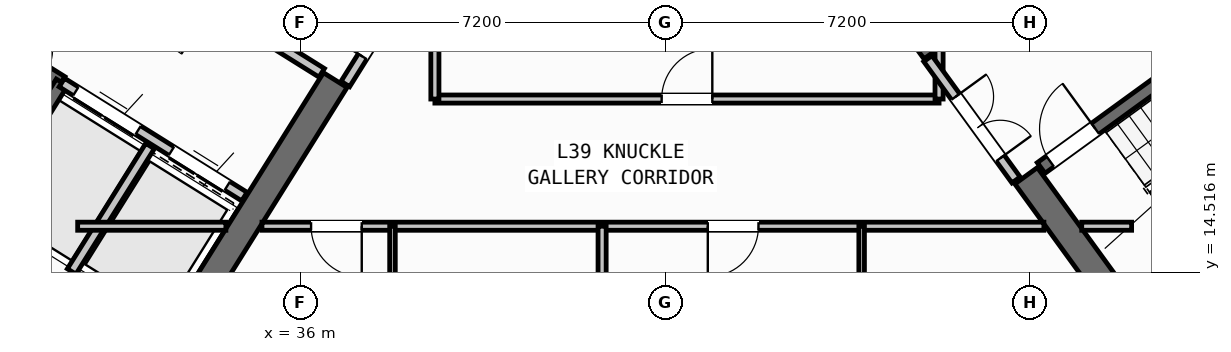
"""IFC4 building model, lengths in metres.
Left out: names, types, materials, properties, quantities, classifications, styles, units other than length and angle.
Written with IfcOpenShell. Run it as: python <this file> out.ifc"""

import sys

from ifc_helpers import new_model, si_unit, direction, frame, frame_2d, origin, place, context, subcontext, project, spatial, rectangle, extrude, source, transform, mapped, element, fill, save


model = new_model("IFC4")
c1 = context("Model", 3, precision=1e-05, world=origin(), true_north=direction((0.0, 1.0)))
c2 = subcontext(c1, "Body", "Model", "MODEL_VIEW")
j1 = project(units=[si_unit("LENGTHUNIT", "METRE"), si_unit("PLANEANGLEUNIT", "RADIAN")], contexts=[c1])
p1 = place(None, origin())
s1 = spatial("IfcSite", under=j1, at=p1, CompositionType="ELEMENT")
p2 = place(p1, origin())
s2 = spatial("IfcBuilding", under=s1, at=p2, CompositionType="ELEMENT")
p3 = place(p2, frame((0.0, 0.0, 155.1)))
s3 = spatial("IfcBuildingStorey", under=s2, at=p3, CompositionType="ELEMENT", Elevation=155.1)
p4 = place(p3, frame((33.366, 12.477, 0.0), z_axis=(0.0, 0.0, 1.0), x_axis=(-0.848047359947, 0.529920442413, 0.0)))
e1 = element("IfcWall", 1, at=p4, inside=s3, PredefinedType="SHEAR", context=c2, shape_type="SweptSolid", body=[
    extrude(rectangle(XDim=13.14, YDim=0.55, at=frame_2d((6.57, 0.0))), origin(), (0.0, 0.0, 1.0), 3.35),
])
p5 = place(p3, frame((36.683, 18.304, 0.0), z_axis=(0.0, 0.0, 1.0), x_axis=(-0.529896466841, -0.848062341122, 0.0)))
e2 = element("IfcWall", 2, at=p5, inside=s3, PredefinedType="SHEAR", context=c2, shape_type="SweptSolid", body=[
    extrude(rectangle(XDim=6.425, YDim=0.55, at=frame_2d((3.212, 0.0))), origin(), (0.0, 0.0, 1.0), 3.35),
])
p6 = place(p3, frame((52.359, 13.14, 0.0), z_axis=(0.0, 0.0, 1.0), x_axis=(0.809014896919, 0.587788139183, 0.0)))
e3 = element("IfcWall", 3, at=p6, inside=s3, PredefinedType="SHEAR", context=c2, shape_type="SweptSolid", body=[
    extrude(rectangle(XDim=12.34, YDim=0.55, at=frame_2d((6.17, 0.0))), origin(), (0.0, 0.0, 1.0), 3.35),
])
p7 = place(p3, frame((52.42, 13.524, 0.0), z_axis=(0.0, 0.0, 1.0), x_axis=(-0.587802113096, 0.809004744015, 0.0)))
e4 = element("IfcWall", 4, at=p7, inside=s3, PredefinedType="SHEAR", context=c2, shape_type="SweptSolid", body=[
    extrude(rectangle(XDim=3.575, YDim=0.55, at=frame_2d((1.788, 0.0))), origin(), (0.0, 0.0, 1.0), 3.35),
])
p8 = place(p3, frame((48.526, 18.884, 0.0), z_axis=(0.0, 0.0, 1.0), x_axis=(-0.587764933797, 0.809031756236, 0.0)))
e5 = element("IfcWall", 5, at=p8, inside=s3, PredefinedType="SHEAR", context=c2, shape_type="SweptSolid", body=[
    extrude(rectangle(XDim=6.425, YDim=0.55, at=frame_2d((3.212, 0.0))), origin(), (0.0, 0.0, 1.0), 3.35),
])
p9 = place(p3, frame((31.28, 18.261, 0.0), z_axis=(0.0, 0.0, 1.0), x_axis=(-0.848051618787, 0.529913626805, 0.0)))
e6 = element("IfcWall", 6, at=p9, inside=s3, PredefinedType="SHEAR", context=c2, shape_type="SweptSolid", body=[
    extrude(rectangle(XDim=7.46, YDim=0.26, at=frame_2d((3.73, 0.0))), origin(), (0.0, 0.0, 1.0), 3.35),
])
p10 = place(p9, frame((0.36, 0.0, 0.0)))
e7 = element("IfcOpeningElement", 7, at=p10, cuts=e6, PredefinedType="OPENING", context=c2, shape_type="SweptSolid", body=[
    extrude(rectangle(XDim=0.86, YDim=2.05, at=frame_2d((0.43, 1.025))), frame((0.0, 0.14, 0.0), z_axis=(0.0, -1.0, 0.0), x_axis=(1.0, 0.0, 0.0)), (0.0, 0.0, 1.0), 0.28),
])
p11 = place(p3, frame((31.288, 18.256, 0.0), z_axis=(0.0, 0.0, 1.0), x_axis=(-0.529943379326, -0.848033026897, 0.0)))
e8 = element("IfcWall", 8, at=p11, inside=s3, PredefinedType="SHEAR", context=c2, shape_type="SweptSolid", body=[
    extrude(rectangle(XDim=3.16, YDim=0.26, at=frame_2d((1.58, 0.0))), origin(), (0.0, 0.0, 1.0), 3.35),
])
p12 = place(p3, frame((34.891, 16.005, 0.0), z_axis=(0.0, 0.0, 1.0), x_axis=(-0.848062873452, 0.529895614884, 0.0)))
e9 = element("IfcWall", 9, at=p12, inside=s3, PredefinedType="STANDARD", context=c2, shape_type="SweptSolid", body=[
    extrude(rectangle(XDim=4.248, YDim=0.2, at=frame_2d((2.124, 0.0))), origin(), (0.0, 0.0, 1.0), 3.34),
])
p13 = place(p12, frame((0.398, 0.0, 0.0)))
e10 = element("IfcOpeningElement", 10, at=p13, cuts=e9, PredefinedType="OPENING", context=c2, shape_type="SweptSolid", body=[
    extrude(rectangle(XDim=1.3, YDim=2.2, at=frame_2d((0.65, 1.1))), frame((0.0, 0.11, 0.0), z_axis=(0.0, -1.0, 0.0), x_axis=(1.0, 0.0, 0.0)), (0.0, 0.0, 1.0), 0.22),
])
p14 = place(p12, frame((2.473, 0.0, 0.0)))
e11 = element("IfcOpeningElement", 11, at=p14, cuts=e9, PredefinedType="OPENING", context=c2, shape_type="SweptSolid", body=[
    extrude(rectangle(XDim=1.45, YDim=2.25, at=frame_2d((0.725, 1.125))), frame((0.0, 0.11, 0.0), z_axis=(0.0, -1.0, 0.0), x_axis=(1.0, 0.0, 0.0)), (0.0, 0.0, 1.0), 0.22),
])
p15 = place(p3, frame((36.417, 18.447, 0.0), z_axis=(0.0, 0.0, 1.0), x_axis=(-0.848064879198, 0.529892404805, 0.0)))
e12 = element("IfcWall", 12, at=p15, inside=s3, PredefinedType="STANDARD", context=c2, shape_type="SweptSolid", body=[
    extrude(rectangle(XDim=5.768, YDim=0.2, at=frame_2d((2.884, 0.0))), origin(), (0.0, 0.0, 1.0), 3.34),
])
p16 = place(p15, frame((2.548, 0.0, 0.0)))
e13 = element("IfcOpeningElement", 13, at=p16, cuts=e12, PredefinedType="OPENING", context=c2, shape_type="SweptSolid", body=[
    extrude(rectangle(XDim=1.15, YDim=2.1, at=frame_2d((0.575, 1.05))), frame((0.0, 0.11, 0.0), z_axis=(0.0, -1.0, 0.0), x_axis=(1.0, 0.0, 0.0)), (0.0, 0.0, 1.0), 0.22),
])
p17 = place(p3, frame((33.029, 17.003, 0.0), z_axis=(0.0, 0.0, 1.0), x_axis=(-0.529916267533, -0.848049968695, 0.0)))
e14 = element("IfcWall", 14, at=p17, inside=s3, PredefinedType="STANDARD", context=c2, shape_type="SweptSolid", body=[
    extrude(rectangle(XDim=2.92, YDim=0.2, at=frame_2d((1.46, 0.0))), origin(), (0.0, 0.0, 1.0), 3.34),
])
p18 = place(p3, frame((52.472, 14.013, 0.0), z_axis=(0.0, 0.0, 1.0), x_axis=(0.809028366311, 0.587769599847, 0.0)))
e15 = element("IfcWall", 15, at=p18, inside=s3, PredefinedType="SHEAR", context=c2, shape_type="SweptSolid", body=[
    extrude(rectangle(XDim=7.33, YDim=0.26, at=frame_2d((3.665, 0.0))), origin(), (0.0, 0.0, 1.0), 3.35),
])
p19 = place(p3, frame((50.615, 16.57, 0.0), z_axis=(0.0, 0.0, 1.0), x_axis=(0.809028366311, 0.587769599847, 0.0)))
e16 = element("IfcWall", 16, at=p19, inside=s3, PredefinedType="SHEAR", context=c2, shape_type="SweptSolid", body=[
    extrude(rectangle(XDim=7.33, YDim=0.26, at=frame_2d((3.665, 0.0))), origin(), (0.0, 0.0, 1.0), 3.35),
])
p20 = place(p19, frame((0.22, 0.0, 0.0)))
e17 = element("IfcOpeningElement", 17, at=p20, cuts=e16, PredefinedType="OPENING", context=c2, shape_type="SweptSolid", body=[
    extrude(rectangle(XDim=1.1, YDim=2.1, at=frame_2d((0.55, 1.05))), frame((0.0, 0.14, 0.0), z_axis=(0.0, -1.0, 0.0), x_axis=(1.0, 0.0, 0.0)), (0.0, 0.0, 1.0), 0.28),
])
p21 = place(p3, frame((32.164, 10.374, 0.0), z_axis=(0.0, 0.0, 1.0), x_axis=(-0.848044107957, 0.529925646633, 0.0)))
e18 = element("IfcWall", 18, at=p21, inside=s3, PredefinedType="PARTITIONING", context=c2, shape_type="SweptSolid", body=[
    extrude(rectangle(XDim=15.57, YDim=0.16, at=frame_2d((7.785, 0.0))), origin(), (0.0, 0.0, 1.0), 3.34),
])
p22 = place(p21, frame((10.83, 0.0, 0.0)))
e19 = element("IfcOpeningElement", 19, at=p22, cuts=e18, PredefinedType="OPENING", context=c2, shape_type="SweptSolid", body=[
    extrude(rectangle(XDim=1.0, YDim=2.1, at=frame_2d((0.5, 1.05))), frame((0.0, 0.09, 0.0), z_axis=(0.0, -1.0, 0.0), x_axis=(1.0, 0.0, 0.0)), (0.0, 0.0, 1.0), 0.18),
])
p23 = place(p3, frame((38.451, 20.737, 0.0), z_axis=(0.0, 0.0, 1.0), x_axis=(-0.529924799939, -0.848044637038, 0.0)))
e20 = element("IfcWall", 20, at=p23, inside=s3, PredefinedType="STANDARD", context=c2, shape_type="SweptSolid", body=[
    extrude(rectangle(XDim=2.96, YDim=0.2, at=frame_2d((1.48, 0.0))), origin(), (0.0, 0.0, 1.0), 3.34),
])
p24 = place(p23, frame((1.46, 0.0, 0.0)))
e21 = element("IfcOpeningElement", 21, at=p24, cuts=e20, PredefinedType="OPENING", context=c2, shape_type="SweptSolid", body=[
    extrude(rectangle(XDim=0.86, YDim=2.05, at=frame_2d((0.43, 1.025))), frame((0.0, 0.11, 0.0), z_axis=(0.0, -1.0, 0.0), x_axis=(1.0, 0.0, 0.0)), (0.0, 0.0, 1.0), 0.22),
])
p25 = place(p3, frame((31.6, 15.42, 0.0), z_axis=(0.0, 0.0, 1.0), x_axis=(1.0, 0.0, 0.0)))
e22 = element("IfcWall", 22, at=p25, inside=s3, PredefinedType="PARTITIONING", context=c2, shape_type="SweptSolid", body=[
    extrude(rectangle(XDim=2.925, YDim=0.16, at=frame_2d((1.462, 0.0))), origin(), (0.0, 0.0, 1.0), 3.34),
])
p26 = place(p3, frame((35.237, 15.42, 0.0), z_axis=(0.0, 0.0, 1.0), x_axis=(1.0, 0.0, 0.0)))
e23 = element("IfcWall", 23, at=p26, inside=s3, PredefinedType="PARTITIONING", context=c2, shape_type="SweptSolid", body=[
    extrude(rectangle(XDim=15.432, YDim=0.16, at=frame_2d((7.716, 0.0))), origin(), (0.0, 0.0, 1.0), 3.34),
])
p27 = place(p26, frame((0.969, 0.0, 0.0)))
e24 = element("IfcOpeningElement", 24, at=p27, cuts=e23, PredefinedType="OPENING", context=c2, shape_type="SweptSolid", body=[
    extrude(rectangle(XDim=1.0, YDim=2.1, at=frame_2d((0.5, 1.05))), frame((0.0, 0.09, 0.0), z_axis=(0.0, -1.0, 0.0), x_axis=(1.0, 0.0, 0.0)), (0.0, 0.0, 1.0), 0.18),
])
p28 = place(p26, frame((8.799, 0.0, 0.0)))
e25 = element("IfcOpeningElement", 25, at=p28, cuts=e23, PredefinedType="OPENING", context=c2, shape_type="SweptSolid", body=[
    extrude(rectangle(XDim=1.0, YDim=2.1, at=frame_2d((0.5, 1.05))), frame((0.0, 0.09, 0.0), z_axis=(0.0, -1.0, 0.0), x_axis=(1.0, 0.0, 0.0)), (0.0, 0.0, 1.0), 0.18),
])
p29 = place(p3, frame((51.416, 15.42, 0.0), z_axis=(0.0, 0.0, 1.0), x_axis=(1.0, 0.0, 0.0)))
e26 = element("IfcWall", 26, at=p29, inside=s3, PredefinedType="PARTITIONING", context=c2, shape_type="SweptSolid", body=[
    extrude(rectangle(XDim=0.984, YDim=0.16, at=frame_2d((0.492, 0.0))), origin(), (0.0, 0.0, 1.0), 3.34),
])
p30 = place(p3, frame((38.65, 17.93, 0.0), z_axis=(0.0, 0.0, 1.0), x_axis=(1.0, 0.0, 0.0)))
e27 = element("IfcWall", 27, at=p30, inside=s3, PredefinedType="PARTITIONING", context=c2, shape_type="SweptSolid", body=[
    extrude(rectangle(XDim=9.95, YDim=0.16, at=frame_2d((4.975, 0.0))), origin(), (0.0, 0.0, 1.0), 3.34),
])
p31 = place(p30, frame((4.475, 0.0, 0.0)))
e28 = element("IfcOpeningElement", 28, at=p31, cuts=e27, PredefinedType="OPENING", context=c2, shape_type="SweptSolid", body=[
    extrude(rectangle(XDim=1.0, YDim=2.1, at=frame_2d((0.5, 1.05))), frame((0.0, 0.09, 0.0), z_axis=(0.0, -1.0, 0.0), x_axis=(1.0, 0.0, 0.0)), (0.0, 0.0, 1.0), 0.18),
])
p32 = place(p3, frame((38.65, 17.93, 0.0), z_axis=(0.0, 0.0, 1.0), x_axis=(0.0, 1.0, 0.0)))
e29 = element("IfcWall", 29, at=p32, inside=s3, PredefinedType="PARTITIONING", context=c2, shape_type="SweptSolid", body=[
    extrude(rectangle(XDim=2.951, YDim=0.16, at=frame_2d((1.476, 0.0))), origin(), (0.0, 0.0, 1.0), 3.34),
])
p33 = place(p3, frame((48.6, 17.93, 0.0), z_axis=(0.0, 0.0, 1.0), x_axis=(0.0, 1.0, 0.0)))
e30 = element("IfcWall", 30, at=p33, inside=s3, PredefinedType="PARTITIONING", context=c2, shape_type="SweptSolid", body=[
    extrude(rectangle(XDim=0.993, YDim=0.16, at=frame_2d((0.496, 0.0))), origin(), (0.0, 0.0, 1.0), 3.34),
])
p34 = place(p3, frame((50.119, 16.333, 0.0), z_axis=(0.0, 0.0, 1.0), x_axis=(-0.587749856981, 0.809042709391, 0.0)))
e31 = element("IfcWall", 31, at=p34, inside=s3, PredefinedType="STANDARD", context=c2, shape_type="SweptSolid", body=[
    extrude(rectangle(XDim=2.96, YDim=0.2, at=frame_2d((1.48, 0.0))), origin(), (0.0, 0.0, 1.0), 3.34),
])
p35 = place(p34, frame((0.53, 0.0, 0.0)))
e32 = element("IfcOpeningElement", 32, at=p35, cuts=e31, PredefinedType="OPENING", context=c2, shape_type="SweptSolid", body=[
    extrude(rectangle(XDim=1.5, YDim=2.15, at=frame_2d((0.75, 1.075))), frame((0.0, 0.11, 0.0), z_axis=(0.0, -1.0, 0.0), x_axis=(1.0, 0.0, 0.0)), (0.0, 0.0, 1.0), 0.22),
])
p36 = place(p3, frame((41.95, 1.96, 0.0), z_axis=(0.0, 0.0, 1.0), x_axis=(0.0, 1.0, 0.0)))
e33 = element("IfcWall", 33, at=p36, inside=s3, PredefinedType="PARTITIONING", context=c2, shape_type="SweptSolid", body=[
    extrude(rectangle(XDim=13.46, YDim=0.16, at=frame_2d((6.73, 0.0))), origin(), (0.0, 0.0, 1.0), 3.34),
])
p37 = place(p3, frame((37.813, 1.96, 0.0), z_axis=(0.0, 0.0, 1.0), x_axis=(0.0, 1.0, 0.0)))
e34 = element("IfcWall", 34, at=p37, inside=s3, PredefinedType="PARTITIONING", context=c2, shape_type="SweptSolid", body=[
    extrude(rectangle(XDim=13.46, YDim=0.11, at=frame_2d((6.73, 0.0))), origin(), (0.0, 0.0, 1.0), 3.34),
])
p38 = place(p37, frame((4.97, 0.0, 0.0)))
e35 = element("IfcOpeningElement", 35, at=p38, cuts=e34, PredefinedType="OPENING", context=c2, shape_type="SweptSolid", body=[
    extrude(rectangle(XDim=0.92, YDim=2.08, at=frame_2d((0.46, 1.04))), frame((0.0, 0.065, 0.0), z_axis=(0.0, -1.0, 0.0), x_axis=(1.0, 0.0, 0.0)), (0.0, 0.0, 1.0), 0.13),
])
p39 = place(p37, frame((8.15, 0.0, 0.0)))
e36 = element("IfcOpeningElement", 36, at=p39, cuts=e34, PredefinedType="OPENING", context=c2, shape_type="SweptSolid", body=[
    extrude(rectangle(XDim=0.88, YDim=2.08, at=frame_2d((0.44, 1.04))), frame((0.0, 0.065, 0.0), z_axis=(0.0, -1.0, 0.0), x_axis=(1.0, 0.0, 0.0)), (0.0, 0.0, 1.0), 0.13),
])
p40 = place(p3, frame((47.072, 1.96, 0.0), z_axis=(0.0, 0.0, 1.0), x_axis=(0.0, 1.0, 0.0)))
e37 = element("IfcWall", 37, at=p40, inside=s3, PredefinedType="PARTITIONING", context=c2, shape_type="SweptSolid", body=[
    extrude(rectangle(XDim=13.46, YDim=0.11, at=frame_2d((6.73, 0.0))), origin(), (0.0, 0.0, 1.0), 3.34),
])
p41 = place(p40, frame((4.97, 0.0, 0.0)))
e38 = element("IfcOpeningElement", 38, at=p41, cuts=e37, PredefinedType="OPENING", context=c2, shape_type="SweptSolid", body=[
    extrude(rectangle(XDim=0.92, YDim=2.08, at=frame_2d((0.46, 1.04))), frame((0.0, 0.065, 0.0), z_axis=(0.0, -1.0, 0.0), x_axis=(1.0, 0.0, 0.0)), (0.0, 0.0, 1.0), 0.13),
])
p42 = place(p40, frame((8.15, 0.0, 0.0)))
e39 = element("IfcOpeningElement", 39, at=p42, cuts=e37, PredefinedType="OPENING", context=c2, shape_type="SweptSolid", body=[
    extrude(rectangle(XDim=0.88, YDim=2.08, at=frame_2d((0.44, 1.04))), frame((0.0, 0.065, 0.0), z_axis=(0.0, -1.0, 0.0), x_axis=(1.0, 0.0, 0.0)), (0.0, 0.0, 1.0), 0.13),
])
m1 = source(origin(), c2, "Body", "SweptSolid", [
    extrude(rectangle(XDim=1.3, YDim=2.2, at=frame_2d((0.65, 1.1))), frame((0.0, 0.025, 0.0), z_axis=(0.0, -1.0, 0.0), x_axis=(1.0, 0.0, 0.0)), (0.0, 0.0, 1.0), 0.05),
])
p43 = place(p13, origin())
e40 = element("IfcDoor", 40, at=p43, inside=s3, OperationType="DOUBLE_DOOR_SLIDING", PredefinedType="DOOR", context=c2, shape_type="MappedRepresentation", body=[
    mapped(m1, transform((0.0, 0.0, 0.0), scale=1.0)),
])
fill(e10, e40)
m2 = source(origin(), c2, "Body", "SweptSolid", [
    extrude(rectangle(XDim=1.45, YDim=2.25, at=frame_2d((0.725, 1.125))), frame((0.0, 0.025, 0.0), z_axis=(0.0, -1.0, 0.0), x_axis=(1.0, 0.0, 0.0)), (0.0, 0.0, 1.0), 0.05),
])
p44 = place(p14, origin())
e41 = element("IfcDoor", 41, at=p44, inside=s3, OperationType="DOUBLE_DOOR_SLIDING", PredefinedType="DOOR", context=c2, shape_type="MappedRepresentation", body=[
    mapped(m2, transform((0.0, 0.0, 0.0), scale=1.0)),
])
fill(e11, e41)
m3 = source(origin(), c2, "Body", "SweptSolid", [
    extrude(rectangle(XDim=1.1, YDim=2.1, at=frame_2d((0.55, 1.05))), frame((0.0, 0.025, 0.0), z_axis=(0.0, -1.0, 0.0), x_axis=(1.0, 0.0, 0.0)), (0.0, 0.0, 1.0), 0.05),
])
p45 = place(p20, origin())
e42 = element("IfcDoor", 42, at=p45, inside=s3, OperationType="SINGLE_SWING_RIGHT", PredefinedType="DOOR", context=c2, shape_type="MappedRepresentation", body=[
    mapped(m3, transform((0.0, 0.0, 0.0), scale=1.0)),
])
fill(e17, e42)
m4 = source(origin(), c2, "Body", "SweptSolid", [
    extrude(rectangle(XDim=1.0, YDim=2.1, at=frame_2d((0.5, 1.05))), frame((0.0, 0.025, 0.0), z_axis=(0.0, -1.0, 0.0), x_axis=(1.0, 0.0, 0.0)), (0.0, 0.0, 1.0), 0.05),
])
p46 = place(p31, origin())
e43 = element("IfcDoor", 43, at=p46, inside=s3, OperationType="SINGLE_SWING_RIGHT", PredefinedType="DOOR", context=c2, shape_type="MappedRepresentation", body=[
    mapped(m4, transform((0.0, 0.0, 0.0), scale=1.0)),
])
fill(e28, e43)
m5 = source(origin(), c2, "Body", "SweptSolid", [
    extrude(rectangle(XDim=0.86, YDim=2.05, at=frame_2d((0.43, 1.025))), frame((0.0, 0.025, 0.0), z_axis=(0.0, -1.0, 0.0), x_axis=(1.0, 0.0, 0.0)), (0.0, 0.0, 1.0), 0.05),
])
p47 = place(p24, frame((0.86, 0.0, 0.0), z_axis=(0.0, 0.0, 1.0), x_axis=(-1.0, 0.0, 0.0)))
e44 = element("IfcDoor", 44, at=p47, inside=s3, OperationType="SINGLE_SWING_LEFT", PredefinedType="DOOR", context=c2, shape_type="MappedRepresentation", body=[
    mapped(m5, transform((0.0, 0.0, 0.0), scale=1.0)),
])
fill(e21, e44)
m6 = source(origin(), c2, "Body", "SweptSolid", [
    extrude(rectangle(XDim=1.5, YDim=2.15, at=frame_2d((0.75, 1.075))), frame((0.0, 0.025, 0.0), z_axis=(0.0, -1.0, 0.0), x_axis=(1.0, 0.0, 0.0)), (0.0, 0.0, 1.0), 0.05),
])
p48 = place(p35, frame((1.5, 0.0, 0.0), z_axis=(0.0, 0.0, 1.0), x_axis=(-1.0, 0.0, 0.0)))
e45 = element("IfcDoor", 45, at=p48, inside=s3, OperationType="DOUBLE_DOOR_SINGLE_SWING", PredefinedType="DOOR", context=c2, shape_type="MappedRepresentation", body=[
    mapped(m6, transform((0.0, 0.0, 0.0), scale=1.0)),
])
fill(e32, e45)
p49 = place(p27, frame((1.0, 0.0, 0.0), z_axis=(0.0, 0.0, 1.0), x_axis=(-1.0, 0.0, 0.0)))
e46 = element("IfcDoor", 46, at=p49, inside=s3, OperationType="SINGLE_SWING_LEFT", PredefinedType="DOOR", context=c2, shape_type="MappedRepresentation", body=[
    mapped(m4, transform((0.0, 0.0, 0.0), scale=1.0)),
])
fill(e24, e46)
p50 = place(p28, frame((1.0, 0.0, 0.0), z_axis=(0.0, 0.0, 1.0), x_axis=(-1.0, 0.0, 0.0)))
e47 = element("IfcDoor", 47, at=p50, inside=s3, OperationType="SINGLE_SWING_RIGHT", PredefinedType="DOOR", context=c2, shape_type="MappedRepresentation", body=[
    mapped(m4, transform((0.0, 0.0, 0.0), scale=1.0)),
])
fill(e25, e47)
save(model, sys.argv[1])
